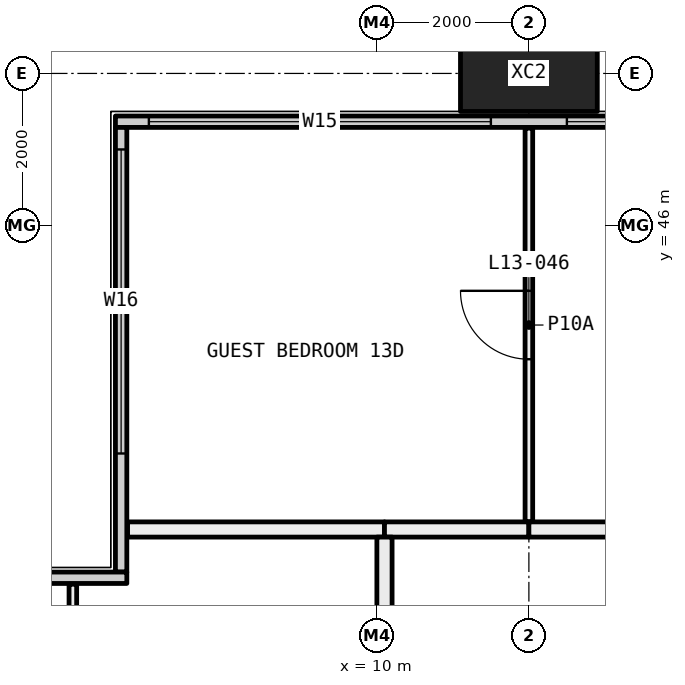
"""IFC4 building model, lengths in metres.
Left out: names, types, materials, properties, quantities, classifications, styles, units other than length and angle.
Written with IfcOpenShell. Run it as: python <this file> out.ifc"""

import sys

from ifc_helpers import new_model, si_unit, direction, frame, frame_2d, origin, origin_2d, place, context, subcontext, project, spatial, rectangle, hollow_rectangle, extrude, element, fill, save


model = new_model("IFC4")
c1 = context("Model", 3, precision=1e-05, world=origin(), true_north=direction((0.0, 1.0)))
c2 = subcontext(c1, "Body", "Model", "MODEL_VIEW")
j1 = project(units=[si_unit("LENGTHUNIT", "METRE"), si_unit("PLANEANGLEUNIT", "RADIAN")], contexts=[c1])
p1 = place(None, origin())
s1 = spatial("IfcSite", under=j1, at=p1, CompositionType="ELEMENT")
p2 = place(p1, origin())
s2 = spatial("IfcBuilding", under=s1, at=p2, CompositionType="ELEMENT")
p3 = place(p2, frame((0.0, 0.0, 57.6)))
s3 = spatial("IfcBuildingStorey", under=s2, at=p3, CompositionType="ELEMENT", Elevation=57.6)
p4 = place(p3, frame((12.0, 48.0, -0.4), z_axis=(0.0, 0.0, 1.0), x_axis=(1.0, 0.0, 0.0)))
e1 = element("IfcColumn", 1, at=p4, inside=s3, PredefinedType="COLUMN", context=c2, shape_type="SweptSolid", body=[
    extrude(hollow_rectangle(XDim=1.8, YDim=1.0, WallThickness=0.07, at=origin_2d()), origin(), (0.0, 0.0, 1.0), 3.45),
])
p5 = place(p3, frame((6.56, 47.365, 0.0), z_axis=(0.0, 0.0, 1.0), x_axis=(1.0, 0.0, 0.0)))
e2 = element("IfcWall", 2, at=p5, inside=s3, PredefinedType="ELEMENTEDWALL", context=c2, shape_type="SweptSolid", body=[
    extrude(rectangle(XDim=58.88, YDim=0.15, at=frame_2d((29.44, 0.0))), origin(), (0.0, 0.0, 1.0), 3.05),
])
p6 = place(p5, frame((0.44, 0.0, 0.45)))
e3 = element("IfcOpeningElement", 3, at=p6, cuts=e2, PredefinedType="OPENING", context=c2, shape_type="SweptSolid", body=[
    extrude(rectangle(XDim=4.5, YDim=2.55, at=frame_2d((2.25, 1.275))), frame((0.0, 0.085, 0.0), z_axis=(0.0, -1.0, 0.0), x_axis=(1.0, 0.0, 0.0)), (0.0, 0.0, 1.0), 0.17),
])
p7 = place(p5, frame((5.94, 0.0, 0.45)))
e4 = element("IfcOpeningElement", 4, at=p7, cuts=e2, PredefinedType="OPENING", context=c2, shape_type="SweptSolid", body=[
    extrude(rectangle(XDim=3.25, YDim=2.55, at=frame_2d((1.625, 1.275))), frame((0.0, 0.085, 0.0), z_axis=(0.0, -1.0, 0.0), x_axis=(1.0, 0.0, 0.0)), (0.0, 0.0, 1.0), 0.17),
])
p8 = place(p5, frame((13.69, 0.0, 0.45)))
e5 = element("IfcOpeningElement", 5, at=p8, cuts=e2, PredefinedType="OPENING", context=c2, shape_type="SweptSolid", body=[
    extrude(rectangle(XDim=3.25, YDim=2.55, at=frame_2d((1.625, 1.275))), frame((0.0, 0.085, 0.0), z_axis=(0.0, -1.0, 0.0), x_axis=(1.0, 0.0, 0.0)), (0.0, 0.0, 1.0), 0.17),
])
p9 = place(p5, frame((17.94, 0.0, 0.45)))
e6 = element("IfcOpeningElement", 6, at=p9, cuts=e2, PredefinedType="OPENING", context=c2, shape_type="SweptSolid", body=[
    extrude(rectangle(XDim=3.25, YDim=2.55, at=frame_2d((1.625, 1.275))), frame((0.0, 0.085, 0.0), z_axis=(0.0, -1.0, 0.0), x_axis=(1.0, 0.0, 0.0)), (0.0, 0.0, 1.0), 0.17),
])
p10 = place(p5, frame((26.94, 0.0, 0.45)))
e7 = element("IfcOpeningElement", 7, at=p10, cuts=e2, PredefinedType="OPENING", context=c2, shape_type="SweptSolid", body=[
    extrude(rectangle(XDim=2.0, YDim=2.55, at=frame_2d((1.0, 1.275))), frame((0.0, 0.085, 0.0), z_axis=(0.0, -1.0, 0.0), x_axis=(1.0, 0.0, 0.0)), (0.0, 0.0, 1.0), 0.17),
])
p11 = place(p5, frame((29.94, 0.0, 0.45)))
e8 = element("IfcOpeningElement", 8, at=p11, cuts=e2, PredefinedType="OPENING", context=c2, shape_type="SweptSolid", body=[
    extrude(rectangle(XDim=3.25, YDim=2.55, at=frame_2d((1.625, 1.275))), frame((0.0, 0.085, 0.0), z_axis=(0.0, -1.0, 0.0), x_axis=(1.0, 0.0, 0.0)), (0.0, 0.0, 1.0), 0.17),
])
p12 = place(p5, frame((37.69, 0.0, 0.45)))
e9 = element("IfcOpeningElement", 9, at=p12, cuts=e2, PredefinedType="OPENING", context=c2, shape_type="SweptSolid", body=[
    extrude(rectangle(XDim=3.25, YDim=2.55, at=frame_2d((1.625, 1.275))), frame((0.0, 0.085, 0.0), z_axis=(0.0, -1.0, 0.0), x_axis=(1.0, 0.0, 0.0)), (0.0, 0.0, 1.0), 0.17),
])
p13 = place(p5, frame((41.94, 0.0, 0.45)))
e10 = element("IfcOpeningElement", 10, at=p13, cuts=e2, PredefinedType="OPENING", context=c2, shape_type="SweptSolid", body=[
    extrude(rectangle(XDim=3.25, YDim=2.55, at=frame_2d((1.625, 1.275))), frame((0.0, 0.085, 0.0), z_axis=(0.0, -1.0, 0.0), x_axis=(1.0, 0.0, 0.0)), (0.0, 0.0, 1.0), 0.17),
])
p14 = place(p5, frame((50.94, 0.0, 0.45)))
e11 = element("IfcOpeningElement", 11, at=p14, cuts=e2, PredefinedType="OPENING", context=c2, shape_type="SweptSolid", body=[
    extrude(rectangle(XDim=2.0, YDim=2.55, at=frame_2d((1.0, 1.275))), frame((0.0, 0.085, 0.0), z_axis=(0.0, -1.0, 0.0), x_axis=(1.0, 0.0, 0.0)), (0.0, 0.0, 1.0), 0.17),
])
p15 = place(p5, frame((53.94, 0.0, 0.45)))
e12 = element("IfcOpeningElement", 12, at=p15, cuts=e2, PredefinedType="OPENING", context=c2, shape_type="SweptSolid", body=[
    extrude(rectangle(XDim=4.5, YDim=2.55, at=frame_2d((2.25, 1.275))), frame((0.0, 0.085, 0.0), z_axis=(0.0, -1.0, 0.0), x_axis=(1.0, 0.0, 0.0)), (0.0, 0.0, 1.0), 0.17),
])
p16 = place(p3, frame((6.635, 41.44, 0.0), z_axis=(0.0, 0.0, 1.0), x_axis=(0.0, 1.0, 0.0)))
e13 = element("IfcWall", 13, at=p16, inside=s3, PredefinedType="ELEMENTEDWALL", context=c2, shape_type="SweptSolid", body=[
    extrude(rectangle(XDim=5.85, YDim=0.15, at=frame_2d((2.925, 0.0))), origin(), (0.0, 0.0, 1.0), 3.05),
])
p17 = place(p16, frame((1.56, 0.0, 0.45)))
e14 = element("IfcOpeningElement", 14, at=p17, cuts=e13, PredefinedType="OPENING", context=c2, shape_type="SweptSolid", body=[
    extrude(rectangle(XDim=4.0, YDim=2.55, at=frame_2d((2.0, 1.275))), frame((0.0, 0.085, 0.0), z_axis=(0.0, -1.0, 0.0), x_axis=(1.0, 0.0, 0.0)), (0.0, 0.0, 1.0), 0.17),
])
p18 = place(p3, frame((0.56, 41.365, 0.0), z_axis=(0.0, 0.0, 1.0), x_axis=(1.0, 0.0, 0.0)))
e15 = element("IfcWall", 15, at=p18, inside=s3, PredefinedType="ELEMENTEDWALL", context=c2, shape_type="SweptSolid", body=[
    extrude(rectangle(XDim=6.15, YDim=0.15, at=frame_2d((3.075, 0.0))), origin(), (0.0, 0.0, 1.0), 3.05),
])
p19 = place(p18, frame((0.44, 0.0, 0.45)))
e16 = element("IfcOpeningElement", 16, at=p19, cuts=e15, PredefinedType="OPENING", context=c2, shape_type="SweptSolid", body=[
    extrude(rectangle(XDim=4.0, YDim=2.55, at=frame_2d((2.0, 1.275))), frame((0.0, 0.085, 0.0), z_axis=(0.0, -1.0, 0.0), x_axis=(1.0, 0.0, 0.0)), (0.0, 0.0, 1.0), 0.17),
])
p20 = place(p3, frame((12.0, 42.1, 0.0), z_axis=(0.0, 0.0, 1.0), x_axis=(0.0, 1.0, 0.0)))
e17 = element("IfcWall", 17, at=p20, inside=s3, PredefinedType="PARTITIONING", context=c2, shape_type="SweptSolid", body=[
    extrude(rectangle(XDim=5.18, YDim=0.1, at=frame_2d((2.59, 0.0))), origin(), (0.0, 0.0, 1.0), 3.05),
])
p21 = place(p20, frame((2.14, 0.0, 0.0)))
e18 = element("IfcOpeningElement", 18, at=p21, cuts=e17, PredefinedType="OPENING", context=c2, shape_type="SweptSolid", body=[
    extrude(rectangle(XDim=0.9, YDim=2.1, at=frame_2d((0.45, 1.05))), frame((0.0, 0.06, 0.0), z_axis=(0.0, -1.0, 0.0), x_axis=(1.0, 0.0, 0.0)), (0.0, 0.0, 1.0), 0.12),
])
p22 = place(p3, frame((6.72, 42.0, 0.0), z_axis=(0.0, 0.0, 1.0), x_axis=(1.0, 0.0, 0.0)))
e19 = element("IfcWall", 19, at=p22, inside=s3, PredefinedType="PARTITIONING", context=c2, shape_type="SweptSolid", body=[
    extrude(rectangle(XDim=3.38, YDim=0.2, at=frame_2d((1.69, 0.0))), origin(), (0.0, 0.0, 1.0), 3.05),
])
p23 = place(p3, frame((10.1, 42.0, 0.0), z_axis=(0.0, 0.0, 1.0), x_axis=(1.0, 0.0, 0.0)))
e20 = element("IfcWall", 20, at=p23, inside=s3, PredefinedType="PARTITIONING", context=c2, shape_type="SweptSolid", body=[
    extrude(rectangle(XDim=1.9, YDim=0.2, at=frame_2d((0.95, 0.0))), origin(), (0.0, 0.0, 1.0), 3.05),
])
p24 = place(p3, frame((12.0, 42.0, 0.0), z_axis=(0.0, 0.0, 1.0), x_axis=(1.0, 0.0, 0.0)))
e21 = element("IfcWall", 21, at=p24, inside=s3, PredefinedType="PARTITIONING", context=c2, shape_type="SweptSolid", body=[
    extrude(rectangle(XDim=6.0, YDim=0.2, at=frame_2d((3.0, 0.0))), origin(), (0.0, 0.0, 1.0), 3.05),
])
p25 = place(p3, frame((6.0, 37.5, 0.0), z_axis=(0.0, 0.0, 1.0), x_axis=(0.0, 1.0, 0.0)))
e22 = element("IfcWall", 22, at=p25, inside=s3, PredefinedType="PARTITIONING", context=c2, shape_type="SweptSolid", body=[
    extrude(rectangle(XDim=3.78, YDim=0.1, at=frame_2d((1.89, 0.0))), origin(), (0.0, 0.0, 1.0), 3.05),
])
p26 = place(p3, frame((10.1, 37.5, 0.0), z_axis=(0.0, 0.0, 1.0), x_axis=(0.0, 1.0, 0.0)))
e23 = element("IfcWall", 23, at=p26, inside=s3, PredefinedType="PARTITIONING", context=c2, shape_type="SweptSolid", body=[
    extrude(rectangle(XDim=4.4, YDim=0.2, at=frame_2d((2.2, 0.0))), origin(), (0.0, 0.0, 1.0), 3.05),
])
p27 = place(p6, origin())
e24 = element("IfcWindow", 24, at=p27, inside=s3, PartitioningType="SINGLE_PANEL", PredefinedType="WINDOW", context=c2, shape_type="SweptSolid", body=[
    extrude(rectangle(XDim=4.5, YDim=2.55, at=frame_2d((2.25, 1.275))), frame((0.0, 0.03, 0.0), z_axis=(0.0, -1.0, 0.0), x_axis=(1.0, 0.0, 0.0)), (0.0, 0.0, 1.0), 0.06),
])
fill(e3, e24)
p28 = place(p7, origin())
e25 = element("IfcWindow", 25, at=p28, inside=s3, PartitioningType="SINGLE_PANEL", PredefinedType="WINDOW", context=c2, shape_type="SweptSolid", body=[
    extrude(rectangle(XDim=3.25, YDim=2.55, at=frame_2d((1.625, 1.275))), frame((0.0, 0.03, 0.0), z_axis=(0.0, -1.0, 0.0), x_axis=(1.0, 0.0, 0.0)), (0.0, 0.0, 1.0), 0.06),
])
fill(e4, e25)
p29 = place(p17, origin())
e26 = element("IfcWindow", 26, at=p29, inside=s3, PartitioningType="SINGLE_PANEL", PredefinedType="WINDOW", context=c2, shape_type="SweptSolid", body=[
    extrude(rectangle(XDim=4.0, YDim=2.55, at=frame_2d((2.0, 1.275))), frame((0.0, 0.03, 0.0), z_axis=(0.0, -1.0, 0.0), x_axis=(1.0, 0.0, 0.0)), (0.0, 0.0, 1.0), 0.06),
])
fill(e14, e26)
p30 = place(p21, origin())
e27 = element("IfcDoor", 27, at=p30, inside=s3, OperationType="SINGLE_SWING_LEFT", PredefinedType="DOOR", context=c2, shape_type="SweptSolid", body=[
    extrude(rectangle(XDim=0.9, YDim=2.1, at=frame_2d((0.45, 1.05))), frame((0.0, 0.025, 0.0), z_axis=(0.0, -1.0, 0.0), x_axis=(1.0, 0.0, 0.0)), (0.0, 0.0, 1.0), 0.05),
])
fill(e18, e27)
save(model, sys.argv[1])
